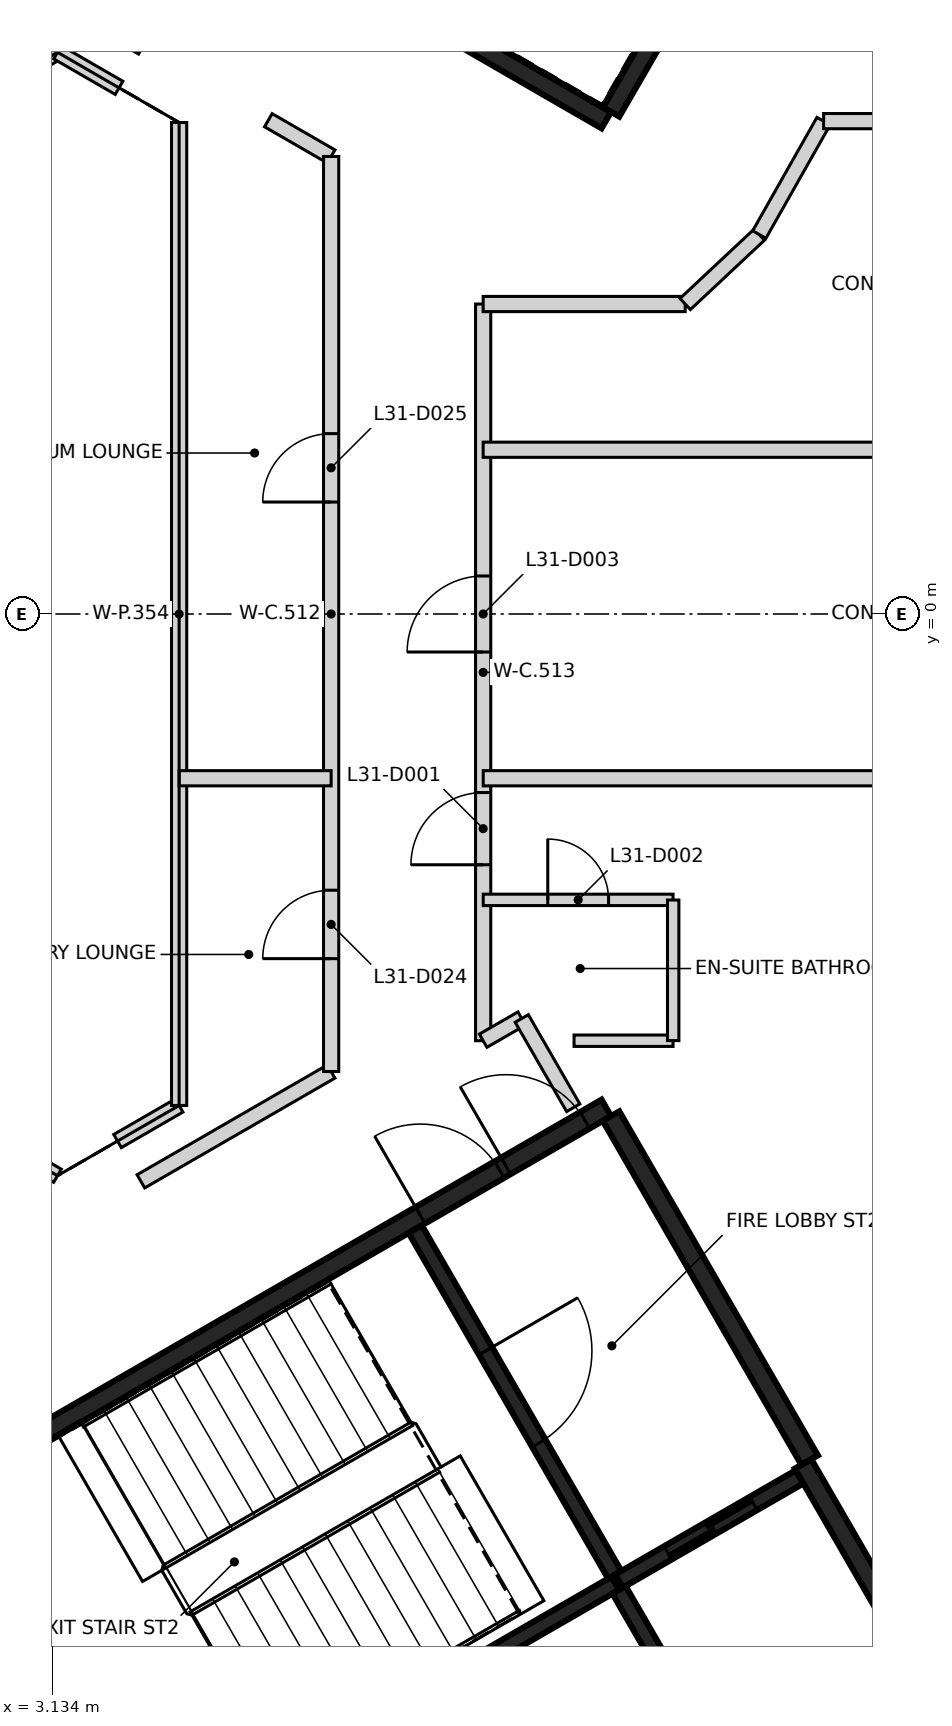
"""IFC4 building model, lengths in metres.
Left out: names, types, materials, properties, quantities, classifications, styles, units other than length and angle.
Written with IfcOpenShell. Run it as: python <this file> out.ifc"""

import sys

from ifc_helpers import new_model, si_unit, direction, frame, frame_2d, origin, place, context, subcontext, project, spatial, rectangle, extrude, element, fill, save


model = new_model("IFC4")
c1 = context("Model", 3, precision=1e-05, world=origin(), true_north=direction((0.0, 1.0)))
c2 = subcontext(c1, "Body", "Model", "MODEL_VIEW")
j1 = project(units=[si_unit("LENGTHUNIT", "METRE"), si_unit("PLANEANGLEUNIT", "RADIAN")], contexts=[c1])
p1 = place(None, origin())
s1 = spatial("IfcSite", under=j1, at=p1, CompositionType="ELEMENT")
p2 = place(p1, origin())
s2 = spatial("IfcBuilding", under=s1, at=p2, CompositionType="ELEMENT")
p3 = place(p2, frame((0.0, 0.0, 128.8)))
s3 = spatial("IfcBuildingStorey", under=s2, at=p3, CompositionType="ELEMENT", Elevation=128.8)
p4 = place(p3, frame((10.42, 6.498, 0.0), z_axis=(0.0, 0.0, 1.0), x_axis=(-0.866021906294, 0.500006057782, 0.0)))
e1 = element("IfcWall", 1, at=p4, inside=s3, PredefinedType="SHEAR", context=c2, shape_type="SweptSolid", body=[
    extrude(rectangle(XDim=11.55, YDim=0.25, at=frame_2d((5.775, 0.0))), origin(), (0.0, 0.0, 1.0), 3.2),
])
p5 = place(p4, frame((10.025, 0.0, 0.0)))
e2 = element("IfcOpeningElement", 2, at=p5, cuts=e1, PredefinedType="OPENING", context=c2, shape_type="SweptSolid", body=[
    extrude(rectangle(XDim=1.2, YDim=2.1, at=frame_2d((0.6, 1.05))), frame((0.0, 0.135, 0.0), z_axis=(0.0, -1.0, 0.0), x_axis=(1.0, 0.0, 0.0)), (0.0, 0.0, 1.0), 0.27),
])
p6 = place(p4, frame((8.725, 0.0, 0.0)))
e3 = element("IfcOpeningElement", 3, at=p6, cuts=e1, PredefinedType="OPENING", context=c2, shape_type="SweptSolid", body=[
    extrude(rectangle(XDim=1.2, YDim=2.1, at=frame_2d((0.6, 1.05))), frame((0.0, 0.135, 0.0), z_axis=(0.0, -1.0, 0.0), x_axis=(1.0, 0.0, 0.0)), (0.0, 0.0, 1.0), 0.27),
])
p7 = place(p3, frame((13.238, 11.378, 0.0), z_axis=(0.0, 0.0, 1.0), x_axis=(-0.500008851346, -0.866020293397, 0.0)))
e4 = element("IfcWall", 4, at=p7, inside=s3, PredefinedType="SHEAR", context=c2, shape_type="SweptSolid", body=[
    extrude(rectangle(XDim=5.51, YDim=0.25, at=frame_2d((2.755, 0.0))), origin(), (0.0, 0.0, 1.0), 3.2),
])
p8 = place(p3, frame((0.417, -12.273, 0.0), z_axis=(0.0, 0.0, 1.0), x_axis=(0.866021906294, 0.500006057782, 0.0)))
e5 = element("IfcWall", 5, at=p8, inside=s3, PredefinedType="SHEAR", context=c2, shape_type="SweptSolid", body=[
    extrude(rectangle(XDim=11.55, YDim=0.25, at=frame_2d((5.775, 0.0))), origin(), (0.0, 0.0, 1.0), 3.2),
])
p9 = place(p8, frame((10.025, 0.0, 0.0)))
e6 = element("IfcOpeningElement", 6, at=p9, cuts=e5, PredefinedType="OPENING", context=c2, shape_type="SweptSolid", body=[
    extrude(rectangle(XDim=1.2, YDim=2.1, at=frame_2d((0.6, 1.05))), frame((0.0, 0.135, 0.0), z_axis=(0.0, -1.0, 0.0), x_axis=(1.0, 0.0, 0.0)), (0.0, 0.0, 1.0), 0.27),
])
p10 = place(p8, frame((8.725, 0.0, 0.0)))
e7 = element("IfcOpeningElement", 7, at=p10, cuts=e5, PredefinedType="OPENING", context=c2, shape_type="SweptSolid", body=[
    extrude(rectangle(XDim=1.2, YDim=2.1, at=frame_2d((0.6, 1.05))), frame((0.0, 0.135, 0.0), z_axis=(0.0, -1.0, 0.0), x_axis=(1.0, 0.0, 0.0)), (0.0, 0.0, 1.0), 0.27),
])
p11 = place(p3, frame((13.008, -11.181, 0.0), z_axis=(0.0, 0.0, 1.0), x_axis=(0.500004234368, -0.866022959057, 0.0)))
e8 = element("IfcWall", 8, at=p11, inside=s3, PredefinedType="SHEAR", context=c2, shape_type="SweptSolid", body=[
    extrude(rectangle(XDim=6.25, YDim=0.25, at=frame_2d((3.125, 0.0))), origin(), (0.0, 0.0, 1.0), 3.2),
])
p12 = place(p3, frame((3.235, -17.153, 0.0), z_axis=(0.0, 0.0, 1.0), x_axis=(-0.500008851346, 0.866020293397, 0.0)))
e9 = element("IfcWall", 9, at=p12, inside=s3, PredefinedType="SHEAR", context=c2, shape_type="SweptSolid", body=[
    extrude(rectangle(XDim=5.51, YDim=0.25, at=frame_2d((2.755, 0.0))), origin(), (0.0, 0.0, 1.0), 3.2),
])
p13 = place(p3, frame((10.483, -6.606, 0.0), z_axis=(0.0, 0.0, 1.0), x_axis=(0.49999885962, -0.866026062182, 0.0)))
e10 = element("IfcWall", 10, at=p13, inside=s3, PredefinedType="SHEAR", context=c2, shape_type="SweptSolid", body=[
    extrude(rectangle(XDim=5.225, YDim=0.25, at=frame_2d((2.612, 0.0))), origin(), (0.0, 0.0, 1.0), 3.2),
])
p14 = place(p3, frame((10.538, -12.752, 0.0), z_axis=(0.0, 0.0, 1.0), x_axis=(-0.866038630372, -0.499977090179, 0.0)))
e11 = element("IfcWall", 11, at=p14, inside=s3, PredefinedType="SHEAR", context=c2, shape_type="SweptSolid", body=[
    extrude(rectangle(XDim=5.699, YDim=0.2, at=frame_2d((2.85, 0.0))), origin(), (0.0, 0.0, 1.0), 3.2),
])
p15 = place(p3, frame((7.906, -8.094, 0.0), z_axis=(0.0, 0.0, 1.0), x_axis=(0.500024287448, -0.866011380966, 0.0)))
e12 = element("IfcWall", 12, at=p15, inside=s3, PredefinedType="SHEAR", context=c2, shape_type="SweptSolid", body=[
    extrude(rectangle(XDim=5.251, YDim=0.2, at=frame_2d((2.625, 0.0))), origin(), (0.0, 0.0, 1.0), 3.2),
])
p16 = place(p15, frame((1.849, 0.0, 0.0)))
e13 = element("IfcOpeningElement", 13, at=p16, cuts=e12, PredefinedType="OPENING", context=c2, shape_type="SweptSolid", body=[
    extrude(rectangle(XDim=1.4, YDim=2.1, at=frame_2d((0.7, 1.05))), frame((0.0, 0.11, 0.0), z_axis=(0.0, -1.0, 0.0), x_axis=(1.0, 0.0, 0.0)), (0.0, 0.0, 1.0), 0.22),
])
p17 = place(p3, frame((11.963, -15.22, 0.0), z_axis=(0.0, 0.0, 1.0), x_axis=(-0.500034990121, 0.866005201286, 0.0)))
e14 = element("IfcWall", 14, at=p17, inside=s3, PredefinedType="SHEAR", context=c2, shape_type="SweptSolid", body=[
    extrude(rectangle(XDim=2.75, YDim=0.2, at=frame_2d((1.375, 0.0))), origin(), (0.0, 0.0, 1.0), 3.2),
])
p18 = place(p3, frame((10.587, -12.723, 0.0), z_axis=(0.0, 0.0, 1.0), x_axis=(0.866037306777, 0.499979382845, 0.0)))
e15 = element("IfcWall", 15, at=p18, inside=s3, PredefinedType="SHEAR", context=c2, shape_type="SweptSolid", body=[
    extrude(rectangle(XDim=2.742, YDim=0.2, at=frame_2d((1.371, 0.0))), origin(), (0.0, 0.0, 1.0), 3.2),
])
p19 = place(p18, frame((0.743, 0.0, 0.0)))
e16 = element("IfcOpeningElement", 16, at=p19, cuts=e15, PredefinedType="OPENING", context=c2, shape_type="SweptSolid", body=[
    extrude(rectangle(XDim=1.3, YDim=2.1, at=frame_2d((0.65, 1.05))), frame((0.0, 0.11, 0.0), z_axis=(0.0, -1.0, 0.0), x_axis=(1.0, 0.0, 0.0)), (0.0, 0.0, 1.0), 0.22),
])
p20 = place(p3, frame((1.813, 8.899, 0.0), z_axis=(0.0, 0.0, 1.0), x_axis=(0.865957732194, -0.50011719232, 0.0)))
e17 = element("IfcWall", 17, at=p20, inside=s3, PredefinedType="PARTITIONING", context=c2, shape_type="SweptSolid", body=[
    extrude(rectangle(XDim=2.891, YDim=0.2, at=frame_2d((1.445, 0.0))), origin(), (0.0, 0.0, 1.0), 2.3),
])
p21 = place(p3, frame((4.297, -7.464, 0.0), z_axis=(0.0, 0.0, 1.0), x_axis=(0.86602521942, 0.500000319328, 0.0)))
e18 = element("IfcWall", 18, at=p21, inside=s3, PredefinedType="PARTITIONING", context=c2, shape_type="SweptSolid", body=[
    extrude(rectangle(XDim=2.89, YDim=0.2, at=frame_2d((1.445, 0.0))), origin(), (0.0, 0.0, 1.0), 2.3),
])
p22 = place(p3, frame((5.974, 6.496, 0.0), z_axis=(0.0, 0.0, 1.0), x_axis=(0.865934055563, -0.500158186394, 0.0)))
e19 = element("IfcWall", 19, at=p22, inside=s3, PredefinedType="PARTITIONING", context=c2, shape_type="SweptSolid", body=[
    extrude(rectangle(XDim=0.954, YDim=0.2, at=frame_2d((0.477, 0.0))), origin(), (0.0, 0.0, 1.0), 3.2),
])
p23 = place(p3, frame((6.8, -6.019, 0.0), z_axis=(0.0, 0.0, 1.0), x_axis=(0.0, 1.0, 0.0)))
e20 = element("IfcWall", 20, at=p23, inside=s3, PredefinedType="PARTITIONING", context=c2, shape_type="SweptSolid", body=[
    extrude(rectangle(XDim=12.038, YDim=0.2, at=frame_2d((6.019, 0.0))), origin(), (0.0, 0.0, 1.0), 3.2),
])
p24 = place(p23, frame((1.485, 0.0, 0.0)))
e21 = element("IfcOpeningElement", 21, at=p24, cuts=e20, PredefinedType="OPENING", context=c2, shape_type="SweptSolid", body=[
    extrude(rectangle(XDim=0.9, YDim=2.1, at=frame_2d((0.45, 1.05))), frame((0.0, 0.11, 0.0), z_axis=(0.0, -1.0, 0.0), x_axis=(1.0, 0.0, 0.0)), (0.0, 0.0, 1.0), 0.22),
])
p25 = place(p23, frame((7.492, 0.0, 0.0)))
e22 = element("IfcOpeningElement", 22, at=p25, cuts=e20, PredefinedType="OPENING", context=c2, shape_type="SweptSolid", body=[
    extrude(rectangle(XDim=0.9, YDim=2.1, at=frame_2d((0.45, 1.05))), frame((0.0, 0.11, 0.0), z_axis=(0.0, -1.0, 0.0), x_axis=(1.0, 0.0, 0.0)), (0.0, 0.0, 1.0), 0.22),
])
p26 = place(p3, frame((8.8, -5.614, 0.0), z_axis=(0.0, 0.0, 1.0), x_axis=(0.0, 1.0, 0.0)))
e23 = element("IfcWall", 23, at=p26, inside=s3, PredefinedType="PARTITIONING", context=c2, shape_type="SweptSolid", body=[
    extrude(rectangle(XDim=9.692, YDim=0.2, at=frame_2d((4.846, 0.0))), origin(), (0.0, 0.0, 1.0), 3.2),
])
p27 = place(p26, frame((2.315, 0.0, 0.0)))
e24 = element("IfcOpeningElement", 24, at=p27, cuts=e23, PredefinedType="OPENING", context=c2, shape_type="SweptSolid", body=[
    extrude(rectangle(XDim=0.95, YDim=2.1, at=frame_2d((0.475, 1.05))), frame((0.0, 0.11, 0.0), z_axis=(0.0, -1.0, 0.0), x_axis=(1.0, 0.0, 0.0)), (0.0, 0.0, 1.0), 0.22),
])
p28 = place(p26, frame((5.114, 0.0, 0.0)))
e25 = element("IfcOpeningElement", 25, at=p28, cuts=e23, PredefinedType="OPENING", context=c2, shape_type="SweptSolid", body=[
    extrude(rectangle(XDim=1.0, YDim=2.1, at=frame_2d((0.5, 1.05))), frame((0.0, 0.11, 0.0), z_axis=(0.0, -1.0, 0.0), x_axis=(1.0, 0.0, 0.0)), (0.0, 0.0, 1.0), 0.22),
])
p29 = place(p3, frame((8.8, -5.614, 0.0), z_axis=(0.0, 0.0, 1.0), x_axis=(0.866491166515, 0.499192406143, 0.0)))
e26 = element("IfcWall", 26, at=p29, inside=s3, PredefinedType="PARTITIONING", context=c2, shape_type="SweptSolid", body=[
    extrude(rectangle(XDim=0.585, YDim=0.2, at=frame_2d((0.292, 0.0))), origin(), (0.0, 0.0, 1.0), 3.2),
])
p30 = place(p3, frame((8.8, 4.078, 0.0), z_axis=(0.0, 0.0, 1.0), x_axis=(1.0, 0.0, 0.0)))
e27 = element("IfcWall", 27, at=p30, inside=s3, PredefinedType="PARTITIONING", context=c2, shape_type="SweptSolid", body=[
    extrude(rectangle(XDim=2.658, YDim=0.2, at=frame_2d((1.329, 0.0))), origin(), (0.0, 0.0, 1.0), 3.2),
])
p31 = place(p3, frame((9.308, -5.322, 0.0), z_axis=(0.0, 0.0, 1.0), x_axis=(0.499644515495, -0.866230545603, 0.0)))
e28 = element("IfcWall", 28, at=p31, inside=s3, PredefinedType="PARTITIONING", context=c2, shape_type="SweptSolid", body=[
    extrude(rectangle(XDim=1.356, YDim=0.2, at=frame_2d((0.678, 0.0))), origin(), (0.0, 0.0, 1.0), 3.2),
])
p32 = place(p3, frame((11.458, 4.078, 0.0), z_axis=(0.0, 0.0, 1.0), x_axis=(0.729936032318, 0.683515463412, 0.0)))
e29 = element("IfcWall", 29, at=p32, inside=s3, PredefinedType="PARTITIONING", context=c2, shape_type="SweptSolid", body=[
    extrude(rectangle(XDim=1.336, YDim=0.2, at=frame_2d((0.668, 0.0))), origin(), (0.0, 0.0, 1.0), 3.2),
])
p33 = place(p3, frame((12.433, 4.992, 0.0), z_axis=(0.0, 0.0, 1.0), x_axis=(0.492807777065, 0.870138204462, 0.0)))
e30 = element("IfcWall", 30, at=p33, inside=s3, PredefinedType="PARTITIONING", context=c2, shape_type="SweptSolid", body=[
    extrude(rectangle(XDim=1.715, YDim=0.2, at=frame_2d((0.857, 0.0))), origin(), (0.0, 0.0, 1.0), 3.2),
])
p34 = place(p3, frame((13.279, 6.484, 0.0), z_axis=(0.0, 0.0, 1.0), x_axis=(1.0, 0.0, 0.0)))
e31 = element("IfcWall", 31, at=p34, inside=s3, PredefinedType="PARTITIONING", context=c2, shape_type="SweptSolid", body=[
    extrude(rectangle(XDim=2.943, YDim=0.2, at=frame_2d((1.471, 0.0))), origin(), (0.0, 0.0, 1.0), 3.2),
])
p35 = place(p34, frame((0.971, 0.0, 0.0)))
e32 = element("IfcOpeningElement", 32, at=p35, cuts=e31, PredefinedType="OPENING", context=c2, shape_type="SweptSolid", body=[
    extrude(rectangle(XDim=1.0, YDim=2.1, at=frame_2d((0.5, 1.05))), frame((0.0, 0.11, 0.0), z_axis=(0.0, -1.0, 0.0), x_axis=(1.0, 0.0, 0.0)), (0.0, 0.0, 1.0), 0.22),
])
for number, where, z_axis, x_axis in (
    (33, (-8.0, 0.924, 0.0), (0.0, 0.0, 1.0), (0.866, 0.5, 0.0)),
    (34, (-8.0, -0.924, 0.0), (0.0, 0.0, 1.0), (0.866, -0.5, 0.0)),
):
    element("IfcWall", number, at=place(p3, frame(where, z_axis=z_axis, x_axis=x_axis)), inside=s3, PredefinedType="PARTITIONING", context=c2, shape_type="SweptSolid", body=[
        extrude(rectangle(XDim=12.932, YDim=0.2, at=frame_2d((6.466, 0.0))), origin(), (0.0, 0.0, 1.0), 2.3),
    ])
p36 = place(p3, frame((3.2, 7.39, 0.0), z_axis=(0.0, 0.0, 1.0), x_axis=(0.865985641702, -0.500068863623, 0.0)))
e35 = element("IfcWall", 35, at=p36, inside=s3, PredefinedType="PARTITIONING", context=c2, shape_type="SweptSolid", body=[
    extrude(rectangle(XDim=0.935, YDim=0.2, at=frame_2d((0.468, 0.0))), origin(), (0.0, 0.0, 1.0), 2.3),
])
p37 = place(p3, frame((3.99, -6.934, 0.0), z_axis=(0.0, 0.0, 1.0), x_axis=(0.865872609263, 0.500264554538, 0.0)))
e36 = element("IfcWall", 36, at=p37, inside=s3, PredefinedType="PARTITIONING", context=c2, shape_type="SweptSolid", body=[
    extrude(rectangle(XDim=0.936, YDim=0.2, at=frame_2d((0.468, 0.0))), origin(), (0.0, 0.0, 1.0), 2.3),
])
p38 = place(p3, frame((4.8, -6.466, 0.0), z_axis=(0.0, 0.0, 1.0), x_axis=(0.0, 1.0, 0.0)))
e37 = element("IfcWall", 37, at=p38, inside=s3, PredefinedType="PARTITIONING", context=c2, shape_type="SweptSolid", body=[
    extrude(rectangle(XDim=12.932, YDim=0.2, at=frame_2d((6.466, 0.0))), origin(), (0.0, 0.0, 1.0), 2.3),
])
p39 = place(p3, frame((4.8, -2.161, 0.0), z_axis=(0.0, 0.0, 1.0), x_axis=(1.0, 0.0, 0.0)))
e38 = element("IfcWall", 38, at=p39, inside=s3, PredefinedType="PARTITIONING", context=c2, shape_type="SweptSolid", body=[
    extrude(rectangle(XDim=2.0, YDim=0.2, at=frame_2d((1.0, 0.0))), origin(), (0.0, 0.0, 1.0), 2.3),
])
p40 = place(p3, frame((8.8, 2.161, 0.0), z_axis=(0.0, 0.0, 1.0), x_axis=(1.0, 0.0, 0.0)))
e39 = element("IfcWall", 39, at=p40, inside=s3, PredefinedType="PARTITIONING", context=c2, shape_type="SweptSolid", body=[
    extrude(rectangle(XDim=12.015, YDim=0.2, at=frame_2d((6.007, 0.0))), origin(), (0.0, 0.0, 1.0), 3.2),
])
p41 = place(p3, frame((8.801, -2.161, 0.0), z_axis=(0.0, 0.0, 1.0), x_axis=(1.0, 0.0, 0.0)))
e40 = element("IfcWall", 40, at=p41, inside=s3, PredefinedType="PARTITIONING", context=c2, shape_type="SweptSolid", body=[
    extrude(rectangle(XDim=12.014, YDim=0.2, at=frame_2d((6.007, 0.0))), origin(), (0.0, 0.0, 1.0), 3.2),
])
p42 = place(p3, frame((8.801, -3.761, 0.0), z_axis=(0.0, 0.0, 1.0), x_axis=(1.0, 0.0, 0.0)))
e41 = element("IfcWall", 41, at=p42, inside=s3, PredefinedType="PARTITIONING", context=c2, shape_type="SweptSolid", body=[
    extrude(rectangle(XDim=2.497, YDim=0.15, at=frame_2d((1.249, 0.0))), origin(), (0.0, 0.0, 1.0), 3.2),
])
p43 = place(p42, frame((0.849, 0.0, 0.0)))
e42 = element("IfcOpeningElement", 42, at=p43, cuts=e41, PredefinedType="OPENING", context=c2, shape_type="SweptSolid", body=[
    extrude(rectangle(XDim=0.8, YDim=2.1, at=frame_2d((0.4, 1.05))), frame((0.0, 0.085, 0.0), z_axis=(0.0, -1.0, 0.0), x_axis=(1.0, 0.0, 0.0)), (0.0, 0.0, 1.0), 0.17),
])
p44 = place(p3, frame((11.298, -5.614, 0.0), z_axis=(0.0, 0.0, 1.0), x_axis=(-1.0, 0.0, 0.0)))
e43 = element("IfcWall", 43, at=p44, inside=s3, PredefinedType="PARTITIONING", context=c2, shape_type="SweptSolid", body=[
    extrude(rectangle(XDim=1.302, YDim=0.15, at=frame_2d((0.651, 0.0))), origin(), (0.0, 0.0, 1.0), 3.2),
])
p45 = place(p3, frame((11.3, -5.612, 0.0), z_axis=(0.0, 0.0, 1.0), x_axis=(0.0, 1.0, 0.0)))
e44 = element("IfcWall", 44, at=p45, inside=s3, PredefinedType="PARTITIONING", context=c2, shape_type="SweptSolid", body=[
    extrude(rectangle(XDim=1.849, YDim=0.15, at=frame_2d((0.925, 0.0))), origin(), (0.0, 0.0, 1.0), 3.2),
])
p46 = place(p19, origin())
e45 = element("IfcDoor", 45, at=p46, inside=s3, OperationType="SLIDING_TO_RIGHT", PredefinedType="DOOR", context=c2, shape_type="SweptSolid", body=[
    extrude(rectangle(XDim=1.3, YDim=2.1, at=frame_2d((0.65, 1.05))), frame((0.0, 0.025, 0.0), z_axis=(0.0, -1.0, 0.0), x_axis=(1.0, 0.0, 0.0)), (0.0, 0.0, 1.0), 0.05),
])
fill(e16, e45)
p47 = place(p9, origin())
e46 = element("IfcDoor", 46, at=p47, inside=s3, OperationType="SINGLE_SWING_LEFT", PredefinedType="DOOR", context=c2, shape_type="SweptSolid", body=[
    extrude(rectangle(XDim=1.2, YDim=2.1, at=frame_2d((0.6, 1.05))), frame((0.0, 0.025, 0.0), z_axis=(0.0, -1.0, 0.0), x_axis=(1.0, 0.0, 0.0)), (0.0, 0.0, 1.0), 0.05),
])
fill(e6, e46)
p48 = place(p10, origin())
e47 = element("IfcDoor", 47, at=p48, inside=s3, OperationType="SINGLE_SWING_RIGHT", PredefinedType="DOOR", context=c2, shape_type="SweptSolid", body=[
    extrude(rectangle(XDim=1.2, YDim=2.1, at=frame_2d((0.6, 1.05))), frame((0.0, 0.025, 0.0), z_axis=(0.0, -1.0, 0.0), x_axis=(1.0, 0.0, 0.0)), (0.0, 0.0, 1.0), 0.05),
])
fill(e7, e47)
p49 = place(p16, origin())
e48 = element("IfcDoor", 48, at=p49, inside=s3, OperationType="SINGLE_SWING_RIGHT", PredefinedType="DOOR", context=c2, shape_type="SweptSolid", body=[
    extrude(rectangle(XDim=1.4, YDim=2.1, at=frame_2d((0.7, 1.05))), frame((0.0, 0.025, 0.0), z_axis=(0.0, -1.0, 0.0), x_axis=(1.0, 0.0, 0.0)), (0.0, 0.0, 1.0), 0.05),
])
fill(e13, e48)
p50 = place(p27, frame((0.95, 0.0, 0.0), z_axis=(0.0, 0.0, 1.0), x_axis=(-1.0, 0.0, 0.0)))
e49 = element("IfcDoor", 49, at=p50, inside=s3, OperationType="SINGLE_SWING_LEFT", PredefinedType="DOOR", context=c2, shape_type="SweptSolid", body=[
    extrude(rectangle(XDim=0.95, YDim=2.1, at=frame_2d((0.475, 1.05))), frame((0.0, 0.025, 0.0), z_axis=(0.0, -1.0, 0.0), x_axis=(1.0, 0.0, 0.0)), (0.0, 0.0, 1.0), 0.05),
])
fill(e24, e49)
p51 = place(p43, frame((0.8, 0.0, 0.0), z_axis=(0.0, 0.0, 1.0), x_axis=(-1.0, 0.0, 0.0)))
e50 = element("IfcDoor", 50, at=p51, inside=s3, OperationType="SINGLE_SWING_LEFT", PredefinedType="DOOR", context=c2, shape_type="SweptSolid", body=[
    extrude(rectangle(XDim=0.8, YDim=2.1, at=frame_2d((0.4, 1.05))), frame((0.0, 0.025, 0.0), z_axis=(0.0, -1.0, 0.0), x_axis=(1.0, 0.0, 0.0)), (0.0, 0.0, 1.0), 0.05),
])
fill(e42, e50)
p52 = place(p28, frame((1.0, 0.0, 0.0), z_axis=(0.0, 0.0, 1.0), x_axis=(-1.0, 0.0, 0.0)))
e51 = element("IfcDoor", 51, at=p52, inside=s3, OperationType="SINGLE_SWING_LEFT", PredefinedType="DOOR", context=c2, shape_type="SweptSolid", body=[
    extrude(rectangle(XDim=1.0, YDim=2.1, at=frame_2d((0.5, 1.05))), frame((0.0, 0.025, 0.0), z_axis=(0.0, -1.0, 0.0), x_axis=(1.0, 0.0, 0.0)), (0.0, 0.0, 1.0), 0.05),
])
fill(e25, e51)
p53 = place(p24, origin())
e52 = element("IfcDoor", 52, at=p53, inside=s3, OperationType="SINGLE_SWING_LEFT", PredefinedType="DOOR", context=c2, shape_type="SweptSolid", body=[
    extrude(rectangle(XDim=0.9, YDim=2.1, at=frame_2d((0.45, 1.05))), frame((0.0, 0.025, 0.0), z_axis=(0.0, -1.0, 0.0), x_axis=(1.0, 0.0, 0.0)), (0.0, 0.0, 1.0), 0.05),
])
fill(e21, e52)
p54 = place(p25, origin())
e53 = element("IfcDoor", 53, at=p54, inside=s3, OperationType="SINGLE_SWING_LEFT", PredefinedType="DOOR", context=c2, shape_type="SweptSolid", body=[
    extrude(rectangle(XDim=0.9, YDim=2.1, at=frame_2d((0.45, 1.05))), frame((0.0, 0.025, 0.0), z_axis=(0.0, -1.0, 0.0), x_axis=(1.0, 0.0, 0.0)), (0.0, 0.0, 1.0), 0.05),
])
fill(e22, e53)
save(model, sys.argv[1])
